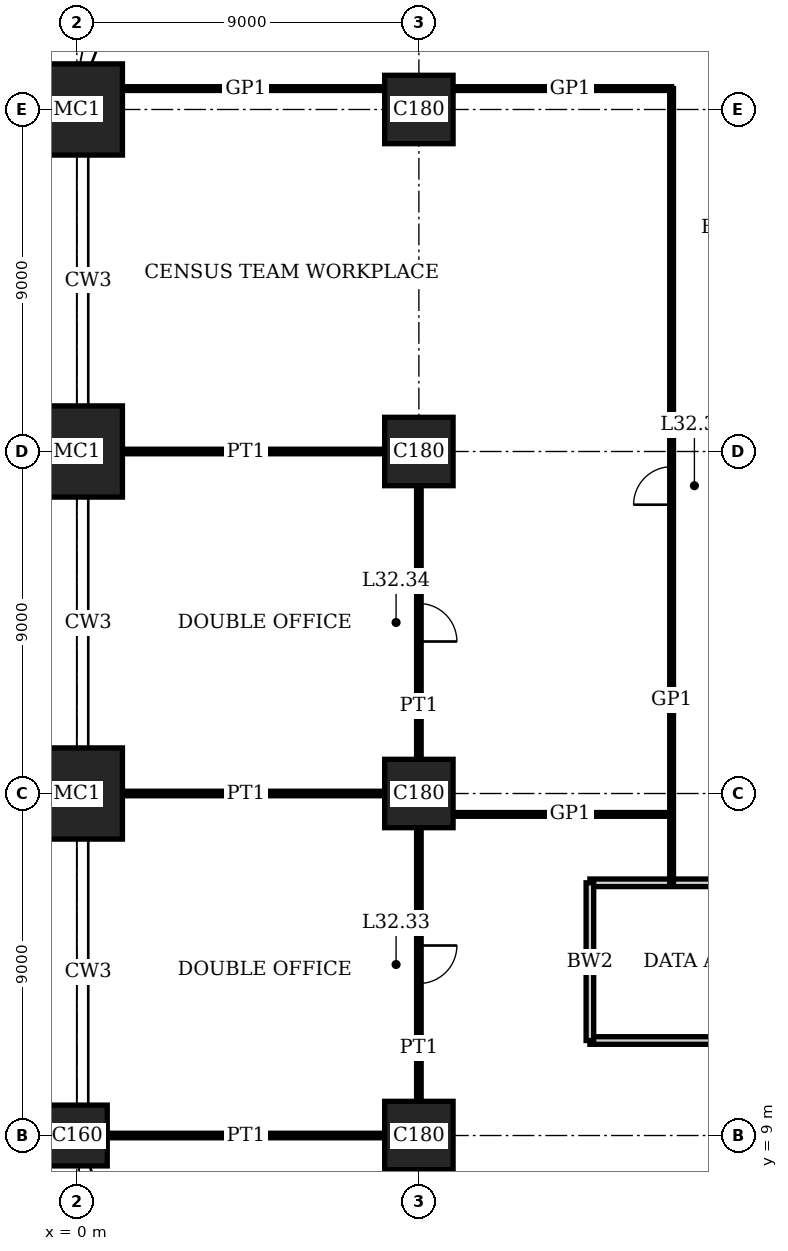
"""IFC4 building model, lengths in metres.
Left out: names, types, materials, properties, quantities, classifications, styles, units other than length and angle.
Written with IfcOpenShell. Run it as: python <this file> out.ifc"""

import sys

from ifc_helpers import new_model, si_unit, direction, frame, frame_2d, origin, origin_2d, place, context, subcontext, project, spatial, rectangle, extrude, element, fill, save


model = new_model("IFC4")
c1 = context("Model", 3, precision=1e-05, world=origin(), true_north=direction((0.0, 1.0)))
c2 = subcontext(c1, "Body", "Model", "MODEL_VIEW")
j1 = project(units=[si_unit("LENGTHUNIT", "METRE"), si_unit("PLANEANGLEUNIT", "RADIAN")], contexts=[c1])
p1 = place(None, origin())
s1 = spatial("IfcSite", under=j1, at=p1, CompositionType="ELEMENT")
p2 = place(p1, origin())
s2 = spatial("IfcBuilding", under=s1, at=p2, CompositionType="ELEMENT")
p3 = place(p2, frame((0.0, 0.0, 133.0)))
s3 = spatial("IfcBuildingStorey", under=s2, at=p3, CompositionType="ELEMENT", Elevation=133.0)
p4 = place(p3, frame((0.0, 9.0, 0.0), z_axis=(0.0, 0.0, 1.0), x_axis=(1.0, 0.0, 0.0)))
e1 = element("IfcColumn", 1, at=p4, inside=s3, PredefinedType="COLUMN", context=c2, shape_type="SweptSolid", body=[
    extrude(rectangle(XDim=1.6, YDim=1.6, at=origin_2d()), origin(), (0.0, 0.0, 1.0), 4.0),
])
for number, where, z_axis, x_axis in (
    (2, (0.0, 18.0, 0.0), (0.0, 0.0, 1.0), (1.0, 0.0, 0.0)),
    (3, (0.0, 27.0, 0.0), (0.0, 0.0, 1.0), (1.0, 0.0, 0.0)),
    (4, (0.0, 36.0, 0.0), (0.0, 0.0, 1.0), (1.0, 0.0, 0.0)),
):
    element("IfcColumn", number, at=place(p3, frame(where, z_axis=z_axis, x_axis=x_axis)), inside=s3, PredefinedType="COLUMN", context=c2, shape_type="SweptSolid", body=[
        extrude(rectangle(XDim=2.4, YDim=2.4, at=origin_2d()), origin(), (0.0, 0.0, 1.0), 4.0),
    ])
for number, where, z_axis, x_axis in (
    (5, (9.0, 9.0, 0.0), (0.0, 0.0, 1.0), (1.0, 0.0, 0.0)),
    (6, (9.0, 18.0, 0.0), (0.0, 0.0, 1.0), (1.0, 0.0, 0.0)),
    (7, (9.0, 27.0, 0.0), (0.0, 0.0, 1.0), (1.0, 0.0, 0.0)),
    (8, (9.0, 36.0, 0.0), (0.0, 0.0, 1.0), (1.0, 0.0, 0.0)),
):
    element("IfcColumn", number, at=place(p3, frame(where, z_axis=z_axis, x_axis=x_axis)), inside=s3, PredefinedType="COLUMN", context=c2, shape_type="SweptSolid", body=[
        extrude(rectangle(XDim=1.8, YDim=1.8, at=origin_2d()), origin(), (0.0, 0.0, 1.0), 4.0),
    ])
p5 = place(p3, frame((0.8, 9.0, 0.0), z_axis=(0.0, 0.0, 1.0), x_axis=(1.0, 0.0, 0.0)))
e9 = element("IfcWall", 9, at=p5, inside=s3, PredefinedType="PARTITIONING", context=c2, shape_type="SweptSolid", body=[
    extrude(rectangle(XDim=7.3, YDim=0.12, at=frame_2d((3.65, 0.0))), origin(), (0.0, 0.0, 1.0), 3.05),
])
p6 = place(p3, frame((13.5, 11.5, 0.0), z_axis=(0.0, 0.0, 1.0), x_axis=(1.0, 0.0, 0.0)))
e10 = element("IfcWall", 10, at=p6, inside=s3, PredefinedType="SOLIDWALL", context=c2, shape_type="SweptSolid", body=[
    extrude(rectangle(XDim=9.0, YDim=0.2, at=frame_2d((4.5, 0.0))), origin(), (0.0, 0.0, 1.0), 3.75),
])
p7 = place(p6, frame((4.0, 0.0, 0.0)))
e11 = element("IfcOpeningElement", 11, at=p7, cuts=e10, PredefinedType="OPENING", context=c2, shape_type="SweptSolid", body=[
    extrude(rectangle(XDim=1.0, YDim=2.4, at=frame_2d((0.5, 1.2))), frame((0.0, 0.11, 0.0), z_axis=(0.0, -1.0, 0.0), x_axis=(1.0, 0.0, 0.0)), (0.0, 0.0, 1.0), 0.22),
])
p8 = place(p3, frame((13.5, 15.65, 0.0), z_axis=(0.0, 0.0, 1.0), x_axis=(1.0, 0.0, 0.0)))
e12 = element("IfcWall", 12, at=p8, inside=s3, PredefinedType="SOLIDWALL", context=c2, shape_type="SweptSolid", body=[
    extrude(rectangle(XDim=9.0, YDim=0.2, at=frame_2d((4.5, 0.0))), origin(), (0.0, 0.0, 1.0), 3.75),
])
p9 = place(p3, frame((9.9, 17.45, 0.0), z_axis=(0.0, 0.0, 1.0), x_axis=(1.0, 0.0, 0.0)))
e13 = element("IfcWall", 13, at=p9, inside=s3, PredefinedType="PARTITIONING", context=c2, shape_type="SweptSolid", body=[
    extrude(rectangle(XDim=5.75, YDim=0.1, at=frame_2d((2.875, 0.0))), origin(), (0.0, 0.0, 1.0), 3.75),
])
for number, where, z_axis, x_axis in (
    (14, (1.2, 18.0, 0.0), (0.0, 0.0, 1.0), (1.0, 0.0, 0.0)),
    (15, (1.2, 27.0, 0.0), (0.0, 0.0, 1.0), (1.0, 0.0, 0.0)),
):
    element("IfcWall", number, at=place(p3, frame(where, z_axis=z_axis, x_axis=x_axis)), inside=s3, PredefinedType="PARTITIONING", context=c2, shape_type="SweptSolid", body=[
        extrude(rectangle(XDim=6.9, YDim=0.12, at=frame_2d((3.45, 0.0))), origin(), (0.0, 0.0, 1.0), 3.05),
    ])
p10 = place(p3, frame((1.2, 36.55, 0.0), z_axis=(0.0, 0.0, 1.0), x_axis=(1.0, 0.0, 0.0)))
e16 = element("IfcWall", 16, at=p10, inside=s3, PredefinedType="PARTITIONING", context=c2, shape_type="SweptSolid", body=[
    extrude(rectangle(XDim=6.9, YDim=0.1, at=frame_2d((3.45, 0.0))), origin(), (0.0, 0.0, 1.0), 3.75),
])
p11 = place(p3, frame((9.9, 36.55, 0.0), z_axis=(0.0, 0.0, 1.0), x_axis=(1.0, 0.0, 0.0)))
e17 = element("IfcWall", 17, at=p11, inside=s3, PredefinedType="PARTITIONING", context=c2, shape_type="SweptSolid", body=[
    extrude(rectangle(XDim=5.75, YDim=0.1, at=frame_2d((2.875, 0.0))), origin(), (0.0, 0.0, 1.0), 3.75),
])
p12 = place(p3, frame((9.0, 9.9, 0.0), z_axis=(0.0, 0.0, 1.0), x_axis=(0.0, 1.0, 0.0)))
e18 = element("IfcWall", 18, at=p12, inside=s3, PredefinedType="PARTITIONING", context=c2, shape_type="SweptSolid", body=[
    extrude(rectangle(XDim=7.2, YDim=0.12, at=frame_2d((3.6, 0.0))), origin(), (0.0, 0.0, 1.0), 3.05),
])
p13 = place(p12, frame((3.1, 0.0, 0.0)))
e19 = element("IfcOpeningElement", 19, at=p13, cuts=e18, PredefinedType="OPENING", context=c2, shape_type="SweptSolid", body=[
    extrude(rectangle(XDim=1.0, YDim=2.4, at=frame_2d((0.5, 1.2))), frame((0.0, 0.07, 0.0), z_axis=(0.0, -1.0, 0.0), x_axis=(1.0, 0.0, 0.0)), (0.0, 0.0, 1.0), 0.14),
])
p14 = place(p3, frame((9.0, 18.9, 0.0), z_axis=(0.0, 0.0, 1.0), x_axis=(0.0, 1.0, 0.0)))
e20 = element("IfcWall", 20, at=p14, inside=s3, PredefinedType="PARTITIONING", context=c2, shape_type="SweptSolid", body=[
    extrude(rectangle(XDim=7.2, YDim=0.12, at=frame_2d((3.6, 0.0))), origin(), (0.0, 0.0, 1.0), 3.05),
])
p15 = place(p14, frame((3.1, 0.0, 0.0)))
e21 = element("IfcOpeningElement", 21, at=p15, cuts=e20, PredefinedType="OPENING", context=c2, shape_type="SweptSolid", body=[
    extrude(rectangle(XDim=1.0, YDim=2.4, at=frame_2d((0.5, 1.2))), frame((0.0, 0.07, 0.0), z_axis=(0.0, -1.0, 0.0), x_axis=(1.0, 0.0, 0.0)), (0.0, 0.0, 1.0), 0.14),
])
p16 = place(p3, frame((13.5, 11.5, 0.0), z_axis=(0.0, 0.0, 1.0), x_axis=(0.0, 1.0, 0.0)))
e22 = element("IfcWall", 22, at=p16, inside=s3, PredefinedType="SOLIDWALL", context=c2, shape_type="SweptSolid", body=[
    extrude(rectangle(XDim=4.15, YDim=0.2, at=frame_2d((2.075, 0.0))), origin(), (0.0, 0.0, 1.0), 3.75),
])
p17 = place(p3, frame((15.65, 15.65, 0.0), z_axis=(0.0, 0.0, 1.0), x_axis=(0.0, 1.0, 0.0)))
e23 = element("IfcWall", 23, at=p17, inside=s3, PredefinedType="PARTITIONING", context=c2, shape_type="SweptSolid", body=[
    extrude(rectangle(XDim=20.9, YDim=0.1, at=frame_2d((10.45, 0.0))), origin(), (0.0, 0.0, 1.0), 3.75),
])
p18 = place(p17, frame((9.95, 0.0, 0.0)))
e24 = element("IfcOpeningElement", 24, at=p18, cuts=e23, PredefinedType="OPENING", context=c2, shape_type="SweptSolid", body=[
    extrude(rectangle(XDim=1.0, YDim=2.4, at=frame_2d((0.5, 1.2))), frame((0.0, 0.06, 0.0), z_axis=(0.0, -1.0, 0.0), x_axis=(1.0, 0.0, 0.0)), (0.0, 0.0, 1.0), 0.12),
])
p19 = place(p13, origin())
e25 = element("IfcDoor", 25, at=p19, inside=s3, OperationType="SINGLE_SWING_RIGHT", PredefinedType="DOOR", context=c2, shape_type="SweptSolid", body=[
    extrude(rectangle(XDim=1.0, YDim=2.4, at=frame_2d((0.5, 1.2))), frame((0.0, 0.025, 0.0), z_axis=(0.0, -1.0, 0.0), x_axis=(1.0, 0.0, 0.0)), (0.0, 0.0, 1.0), 0.05),
])
fill(e19, e25)
p20 = place(p15, origin())
e26 = element("IfcDoor", 26, at=p20, inside=s3, OperationType="SINGLE_SWING_LEFT", PredefinedType="DOOR", context=c2, shape_type="SweptSolid", body=[
    extrude(rectangle(XDim=1.0, YDim=2.4, at=frame_2d((0.5, 1.2))), frame((0.0, 0.025, 0.0), z_axis=(0.0, -1.0, 0.0), x_axis=(1.0, 0.0, 0.0)), (0.0, 0.0, 1.0), 0.05),
])
fill(e21, e26)
p21 = place(p18, origin())
e27 = element("IfcDoor", 27, at=p21, inside=s3, OperationType="SINGLE_SWING_RIGHT", PredefinedType="DOOR", context=c2, shape_type="SweptSolid", body=[
    extrude(rectangle(XDim=1.0, YDim=2.4, at=frame_2d((0.5, 1.2))), frame((0.0, 0.02, 0.0), z_axis=(0.0, -1.0, 0.0), x_axis=(1.0, 0.0, 0.0)), (0.0, 0.0, 1.0), 0.04),
])
fill(e24, e27)
save(model, sys.argv[1])
